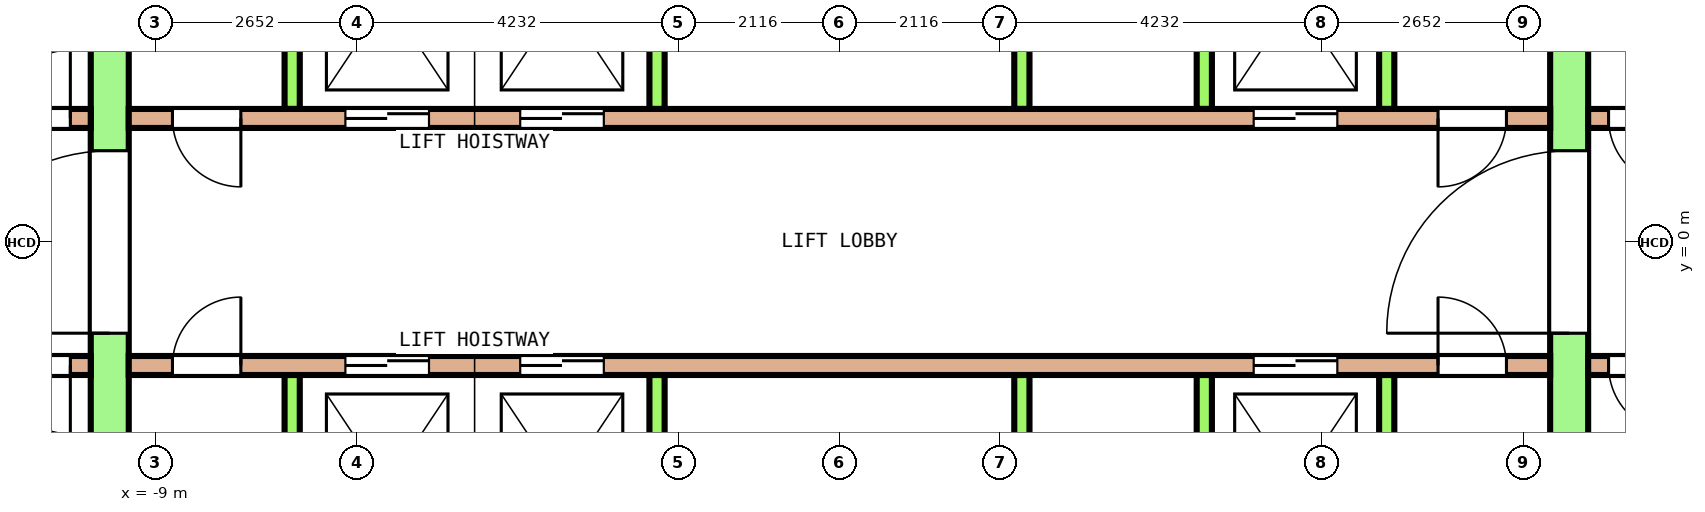
"""IFC4 building model, lengths in metres.
Left out: names, types, materials, properties, quantities, classifications, styles, units other than length and angle.
Written with IfcOpenShell. Run it as: python <this file> out.ifc"""

import sys

from ifc_helpers import new_model, si_unit, direction, frame, frame_2d, origin, place, context, subcontext, project, spatial, rectangle, extrude, element, fill, save


model = new_model("IFC4")
c1 = context("Model", 3, precision=1e-05, world=origin(), true_north=direction((0.0, 1.0)))
c2 = subcontext(c1, "Body", "Model", "MODEL_VIEW")
j1 = project(units=[si_unit("LENGTHUNIT", "METRE"), si_unit("PLANEANGLEUNIT", "RADIAN")], contexts=[c1])
p1 = place(None, origin())
s1 = spatial("IfcSite", under=j1, at=p1, CompositionType="ELEMENT")
p2 = place(p1, origin())
s2 = spatial("IfcBuilding", under=s1, at=p2, CompositionType="ELEMENT")
p3 = place(p2, frame((0.0, 0.0, 162.8)))
s3 = spatial("IfcBuildingStorey", under=s2, at=p3, CompositionType="ELEMENT", Elevation=162.8)
p4 = place(p3, frame((-9.6, -7.75, 0.0), z_axis=(0.0, 0.0, 1.0), x_axis=(0.0, 1.0, 0.0)))
e1 = element("IfcWall", 1, at=p4, inside=s3, PredefinedType="SHEAR", context=c2, shape_type="SweptSolid", body=[
    extrude(rectangle(XDim=15.5, YDim=0.5, at=frame_2d((7.75, 0.0))), origin(), (0.0, 0.0, 1.0), 4.1),
])
p5 = place(p4, frame((6.55, 0.0, 0.0)))
e2 = element("IfcOpeningElement", 2, at=p5, cuts=e1, PredefinedType="OPENING", context=c2, shape_type="SweptSolid", body=[
    extrude(rectangle(XDim=2.4, YDim=2.1, at=frame_2d((1.2, 1.05))), frame((0.0, 0.26, 0.0), z_axis=(0.0, -1.0, 0.0), x_axis=(1.0, 0.0, 0.0)), (0.0, 0.0, 1.0), 0.52),
])
p6 = place(p4, frame((13.45, 0.0, 0.0)))
e3 = element("IfcOpeningElement", 3, at=p6, cuts=e1, PredefinedType="OPENING", context=c2, shape_type="SweptSolid", body=[
    extrude(rectangle(XDim=1.2, YDim=2.1, at=frame_2d((0.6, 1.05))), frame((0.0, 0.26, 0.0), z_axis=(0.0, -1.0, 0.0), x_axis=(1.0, 0.0, 0.0)), (0.0, 0.0, 1.0), 0.52),
])
p7 = place(p4, frame((0.85, 0.0, 0.0)))
e4 = element("IfcOpeningElement", 4, at=p7, cuts=e1, PredefinedType="OPENING", context=c2, shape_type="SweptSolid", body=[
    extrude(rectangle(XDim=1.2, YDim=2.1, at=frame_2d((0.6, 1.05))), frame((0.0, 0.26, 0.0), z_axis=(0.0, -1.0, 0.0), x_axis=(1.0, 0.0, 0.0)), (0.0, 0.0, 1.0), 0.52),
])
p8 = place(p3, frame((9.6, -7.75, 0.0), z_axis=(0.0, 0.0, 1.0), x_axis=(0.0, 1.0, 0.0)))
e5 = element("IfcWall", 5, at=p8, inside=s3, PredefinedType="SHEAR", context=c2, shape_type="SweptSolid", body=[
    extrude(rectangle(XDim=15.5, YDim=0.5, at=frame_2d((7.75, 0.0))), origin(), (0.0, 0.0, 1.0), 4.1),
])
p9 = place(p8, frame((6.55, 0.0, 0.0)))
e6 = element("IfcOpeningElement", 6, at=p9, cuts=e5, PredefinedType="OPENING", context=c2, shape_type="SweptSolid", body=[
    extrude(rectangle(XDim=2.4, YDim=2.1, at=frame_2d((1.2, 1.05))), frame((0.0, 0.26, 0.0), z_axis=(0.0, -1.0, 0.0), x_axis=(1.0, 0.0, 0.0)), (0.0, 0.0, 1.0), 0.52),
])
p10 = place(p8, frame((13.45, 0.0, 0.0)))
e7 = element("IfcOpeningElement", 7, at=p10, cuts=e5, PredefinedType="OPENING", context=c2, shape_type="SweptSolid", body=[
    extrude(rectangle(XDim=1.2, YDim=2.1, at=frame_2d((0.6, 1.05))), frame((0.0, 0.26, 0.0), z_axis=(0.0, -1.0, 0.0), x_axis=(1.0, 0.0, 0.0)), (0.0, 0.0, 1.0), 0.52),
])
p11 = place(p8, frame((0.95, 0.0, 0.0)))
e8 = element("IfcOpeningElement", 8, at=p11, cuts=e5, PredefinedType="OPENING", context=c2, shape_type="SweptSolid", body=[
    extrude(rectangle(XDim=1.0, YDim=2.1, at=frame_2d((0.5, 1.05))), frame((0.0, 0.26, 0.0), z_axis=(0.0, -1.0, 0.0), x_axis=(1.0, 0.0, 0.0)), (0.0, 0.0, 1.0), 0.52),
])
p12 = place(p3, frame((-12.85, 1.625, 0.0), z_axis=(0.0, 0.0, 1.0), x_axis=(1.0, 0.0, 0.0)))
e9 = element("IfcWall", 9, at=p12, inside=s3, PredefinedType="SOLIDWALL", context=c2, shape_type="SweptSolid", body=[
    extrude(rectangle(XDim=3.0, YDim=0.25, at=frame_2d((1.5, 0.0))), origin(), (0.0, 0.0, 1.0), 4.1),
])
p13 = place(p12, frame((0.269, 0.0, 0.0)))
e10 = element("IfcOpeningElement", 10, at=p13, cuts=e9, PredefinedType="OPENING", context=c2, shape_type="SweptSolid", body=[
    extrude(rectangle(XDim=0.9, YDim=2.1, at=frame_2d((0.45, 1.05))), frame((0.0, 0.135, 0.0), z_axis=(0.0, -1.0, 0.0), x_axis=(1.0, 0.0, 0.0)), (0.0, 0.0, 1.0), 0.27),
])
p14 = place(p12, frame((1.831, 0.0, 0.0)))
e11 = element("IfcOpeningElement", 11, at=p14, cuts=e9, PredefinedType="OPENING", context=c2, shape_type="SweptSolid", body=[
    extrude(rectangle(XDim=0.9, YDim=2.1, at=frame_2d((0.45, 1.05))), frame((0.0, 0.135, 0.0), z_axis=(0.0, -1.0, 0.0), x_axis=(1.0, 0.0, 0.0)), (0.0, 0.0, 1.0), 0.27),
])
p15 = place(p3, frame((-9.35, 1.625, 0.0), z_axis=(0.0, 0.0, 1.0), x_axis=(1.0, 0.0, 0.0)))
e12 = element("IfcWall", 12, at=p15, inside=s3, PredefinedType="SOLIDWALL", context=c2, shape_type="SweptSolid", body=[
    extrude(rectangle(XDim=18.7, YDim=0.25, at=frame_2d((9.35, 0.0))), origin(), (0.0, 0.0, 1.0), 4.1),
])
p16 = place(p15, frame((2.85, 0.0, 0.0)))
e13 = element("IfcOpeningElement", 13, at=p16, cuts=e12, PredefinedType="OPENING", context=c2, shape_type="SweptSolid", body=[
    extrude(rectangle(XDim=1.1, YDim=2.1, at=frame_2d((0.55, 1.05))), frame((0.0, 0.135, 0.0), z_axis=(0.0, -1.0, 0.0), x_axis=(1.0, 0.0, 0.0)), (0.0, 0.0, 1.0), 0.27),
])
p17 = place(p15, frame((5.15, 0.0, 0.0)))
e14 = element("IfcOpeningElement", 14, at=p17, cuts=e12, PredefinedType="OPENING", context=c2, shape_type="SweptSolid", body=[
    extrude(rectangle(XDim=1.1, YDim=2.1, at=frame_2d((0.55, 1.05))), frame((0.0, 0.135, 0.0), z_axis=(0.0, -1.0, 0.0), x_axis=(1.0, 0.0, 0.0)), (0.0, 0.0, 1.0), 0.27),
])
p18 = place(p15, frame((14.8, 0.0, 0.0)))
e15 = element("IfcOpeningElement", 15, at=p18, cuts=e12, PredefinedType="OPENING", context=c2, shape_type="SweptSolid", body=[
    extrude(rectangle(XDim=1.1, YDim=2.1, at=frame_2d((0.55, 1.05))), frame((0.0, 0.135, 0.0), z_axis=(0.0, -1.0, 0.0), x_axis=(1.0, 0.0, 0.0)), (0.0, 0.0, 1.0), 0.27),
])
p19 = place(p15, frame((0.575, 0.0, 0.0)))
e16 = element("IfcOpeningElement", 16, at=p19, cuts=e12, PredefinedType="OPENING", context=c2, shape_type="SweptSolid", body=[
    extrude(rectangle(XDim=0.9, YDim=2.1, at=frame_2d((0.45, 1.05))), frame((0.0, 0.135, 0.0), z_axis=(0.0, -1.0, 0.0), x_axis=(1.0, 0.0, 0.0)), (0.0, 0.0, 1.0), 0.27),
])
p20 = place(p15, frame((17.225, 0.0, 0.0)))
e17 = element("IfcOpeningElement", 17, at=p20, cuts=e12, PredefinedType="OPENING", context=c2, shape_type="SweptSolid", body=[
    extrude(rectangle(XDim=0.9, YDim=2.1, at=frame_2d((0.45, 1.05))), frame((0.0, 0.135, 0.0), z_axis=(0.0, -1.0, 0.0), x_axis=(1.0, 0.0, 0.0)), (0.0, 0.0, 1.0), 0.27),
])
p21 = place(p3, frame((9.85, 1.625, 0.0), z_axis=(0.0, 0.0, 1.0), x_axis=(1.0, 0.0, 0.0)))
e18 = element("IfcWall", 18, at=p21, inside=s3, PredefinedType="SOLIDWALL", context=c2, shape_type="SweptSolid", body=[
    extrude(rectangle(XDim=3.0, YDim=0.25, at=frame_2d((1.5, 0.0))), origin(), (0.0, 0.0, 1.0), 4.1),
])
p22 = place(p21, frame((0.269, 0.0, 0.0)))
e19 = element("IfcOpeningElement", 19, at=p22, cuts=e18, PredefinedType="OPENING", context=c2, shape_type="SweptSolid", body=[
    extrude(rectangle(XDim=0.9, YDim=2.1, at=frame_2d((0.45, 1.05))), frame((0.0, 0.135, 0.0), z_axis=(0.0, -1.0, 0.0), x_axis=(1.0, 0.0, 0.0)), (0.0, 0.0, 1.0), 0.27),
])
p23 = place(p21, frame((1.831, 0.0, 0.0)))
e20 = element("IfcOpeningElement", 20, at=p23, cuts=e18, PredefinedType="OPENING", context=c2, shape_type="SweptSolid", body=[
    extrude(rectangle(XDim=0.9, YDim=2.1, at=frame_2d((0.45, 1.05))), frame((0.0, 0.135, 0.0), z_axis=(0.0, -1.0, 0.0), x_axis=(1.0, 0.0, 0.0)), (0.0, 0.0, 1.0), 0.27),
])
for number, where, z_axis, x_axis in (
    (21, (-7.2, 1.75, 0.0), (0.0, 0.0, 1.0), (0.0, 1.0, 0.0)),
    (22, (-2.4, 1.75, 0.0), (0.0, 0.0, 1.0), (0.0, 1.0, 0.0)),
    (23, (2.4, 1.75, 0.0), (0.0, 0.0, 1.0), (0.0, 1.0, 0.0)),
    (24, (4.8, 1.75, 0.0), (0.0, 0.0, 1.0), (0.0, 1.0, 0.0)),
    (25, (7.2, 1.75, 0.0), (0.0, 0.0, 1.0), (0.0, 1.0, 0.0)),
):
    element("IfcWall", number, at=place(p3, frame(where, z_axis=z_axis, x_axis=x_axis)), inside=s3, PredefinedType="SOLIDWALL", context=c2, shape_type="SweptSolid", body=[
        extrude(rectangle(XDim=2.9, YDim=0.2, at=frame_2d((1.45, 0.0))), origin(), (0.0, 0.0, 1.0), 4.1),
    ])
p24 = place(p3, frame((-12.85, -1.625, 0.0), z_axis=(0.0, 0.0, 1.0), x_axis=(1.0, 0.0, 0.0)))
e26 = element("IfcWall", 26, at=p24, inside=s3, PredefinedType="SOLIDWALL", context=c2, shape_type="SweptSolid", body=[
    extrude(rectangle(XDim=3.0, YDim=0.25, at=frame_2d((1.5, 0.0))), origin(), (0.0, 0.0, 1.0), 4.1),
])
p25 = place(p24, frame((0.269, 0.0, 0.0)))
e27 = element("IfcOpeningElement", 27, at=p25, cuts=e26, PredefinedType="OPENING", context=c2, shape_type="SweptSolid", body=[
    extrude(rectangle(XDim=0.9, YDim=2.1, at=frame_2d((0.45, 1.05))), frame((0.0, 0.135, 0.0), z_axis=(0.0, -1.0, 0.0), x_axis=(1.0, 0.0, 0.0)), (0.0, 0.0, 1.0), 0.27),
])
p26 = place(p24, frame((1.831, 0.0, 0.0)))
e28 = element("IfcOpeningElement", 28, at=p26, cuts=e26, PredefinedType="OPENING", context=c2, shape_type="SweptSolid", body=[
    extrude(rectangle(XDim=0.9, YDim=2.1, at=frame_2d((0.45, 1.05))), frame((0.0, 0.135, 0.0), z_axis=(0.0, -1.0, 0.0), x_axis=(1.0, 0.0, 0.0)), (0.0, 0.0, 1.0), 0.27),
])
p27 = place(p3, frame((-9.35, -1.625, 0.0), z_axis=(0.0, 0.0, 1.0), x_axis=(1.0, 0.0, 0.0)))
e29 = element("IfcWall", 29, at=p27, inside=s3, PredefinedType="SOLIDWALL", context=c2, shape_type="SweptSolid", body=[
    extrude(rectangle(XDim=18.7, YDim=0.25, at=frame_2d((9.35, 0.0))), origin(), (0.0, 0.0, 1.0), 4.1),
])
p28 = place(p27, frame((2.85, 0.0, 0.0)))
e30 = element("IfcOpeningElement", 30, at=p28, cuts=e29, PredefinedType="OPENING", context=c2, shape_type="SweptSolid", body=[
    extrude(rectangle(XDim=1.1, YDim=2.1, at=frame_2d((0.55, 1.05))), frame((0.0, 0.135, 0.0), z_axis=(0.0, -1.0, 0.0), x_axis=(1.0, 0.0, 0.0)), (0.0, 0.0, 1.0), 0.27),
])
p29 = place(p27, frame((5.15, 0.0, 0.0)))
e31 = element("IfcOpeningElement", 31, at=p29, cuts=e29, PredefinedType="OPENING", context=c2, shape_type="SweptSolid", body=[
    extrude(rectangle(XDim=1.1, YDim=2.1, at=frame_2d((0.55, 1.05))), frame((0.0, 0.135, 0.0), z_axis=(0.0, -1.0, 0.0), x_axis=(1.0, 0.0, 0.0)), (0.0, 0.0, 1.0), 0.27),
])
p30 = place(p27, frame((14.8, 0.0, 0.0)))
e32 = element("IfcOpeningElement", 32, at=p30, cuts=e29, PredefinedType="OPENING", context=c2, shape_type="SweptSolid", body=[
    extrude(rectangle(XDim=1.1, YDim=2.1, at=frame_2d((0.55, 1.05))), frame((0.0, 0.135, 0.0), z_axis=(0.0, -1.0, 0.0), x_axis=(1.0, 0.0, 0.0)), (0.0, 0.0, 1.0), 0.27),
])
p31 = place(p27, frame((0.575, 0.0, 0.0)))
e33 = element("IfcOpeningElement", 33, at=p31, cuts=e29, PredefinedType="OPENING", context=c2, shape_type="SweptSolid", body=[
    extrude(rectangle(XDim=0.9, YDim=2.1, at=frame_2d((0.45, 1.05))), frame((0.0, 0.135, 0.0), z_axis=(0.0, -1.0, 0.0), x_axis=(1.0, 0.0, 0.0)), (0.0, 0.0, 1.0), 0.27),
])
p32 = place(p27, frame((17.225, 0.0, 0.0)))
e34 = element("IfcOpeningElement", 34, at=p32, cuts=e29, PredefinedType="OPENING", context=c2, shape_type="SweptSolid", body=[
    extrude(rectangle(XDim=0.9, YDim=2.1, at=frame_2d((0.45, 1.05))), frame((0.0, 0.135, 0.0), z_axis=(0.0, -1.0, 0.0), x_axis=(1.0, 0.0, 0.0)), (0.0, 0.0, 1.0), 0.27),
])
p33 = place(p3, frame((9.85, -1.625, 0.0), z_axis=(0.0, 0.0, 1.0), x_axis=(1.0, 0.0, 0.0)))
e35 = element("IfcWall", 35, at=p33, inside=s3, PredefinedType="SOLIDWALL", context=c2, shape_type="SweptSolid", body=[
    extrude(rectangle(XDim=3.0, YDim=0.25, at=frame_2d((1.5, 0.0))), origin(), (0.0, 0.0, 1.0), 4.1),
])
p34 = place(p33, frame((0.269, 0.0, 0.0)))
e36 = element("IfcOpeningElement", 36, at=p34, cuts=e35, PredefinedType="OPENING", context=c2, shape_type="SweptSolid", body=[
    extrude(rectangle(XDim=0.9, YDim=2.1, at=frame_2d((0.45, 1.05))), frame((0.0, 0.135, 0.0), z_axis=(0.0, -1.0, 0.0), x_axis=(1.0, 0.0, 0.0)), (0.0, 0.0, 1.0), 0.27),
])
p35 = place(p33, frame((1.831, 0.0, 0.0)))
e37 = element("IfcOpeningElement", 37, at=p35, cuts=e35, PredefinedType="OPENING", context=c2, shape_type="SweptSolid", body=[
    extrude(rectangle(XDim=0.9, YDim=2.1, at=frame_2d((0.45, 1.05))), frame((0.0, 0.135, 0.0), z_axis=(0.0, -1.0, 0.0), x_axis=(1.0, 0.0, 0.0)), (0.0, 0.0, 1.0), 0.27),
])
for number, where, z_axis, x_axis in (
    (38, (-7.2, -4.65, 0.0), (0.0, 0.0, 1.0), (0.0, 1.0, 0.0)),
    (39, (-2.4, -4.65, 0.0), (0.0, 0.0, 1.0), (0.0, 1.0, 0.0)),
    (40, (2.4, -4.65, 0.0), (0.0, 0.0, 1.0), (0.0, 1.0, 0.0)),
    (41, (4.8, -4.65, 0.0), (0.0, 0.0, 1.0), (0.0, 1.0, 0.0)),
    (42, (7.2, -4.65, 0.0), (0.0, 0.0, 1.0), (0.0, 1.0, 0.0)),
):
    element("IfcWall", number, at=place(p3, frame(where, z_axis=z_axis, x_axis=x_axis)), inside=s3, PredefinedType="SOLIDWALL", context=c2, shape_type="SweptSolid", body=[
        extrude(rectangle(XDim=2.9, YDim=0.2, at=frame_2d((1.45, 0.0))), origin(), (0.0, 0.0, 1.0), 4.1),
    ])
p36 = place(p16, origin())
e43 = element("IfcDoor", 43, at=p36, inside=s3, OperationType="DOUBLE_DOOR_SLIDING", PredefinedType="DOOR", context=c2, shape_type="SweptSolid", body=[
    extrude(rectangle(XDim=1.1, YDim=2.1, at=frame_2d((0.55, 1.05))), frame((0.0, 0.075, 0.0), z_axis=(0.0, -1.0, 0.0), x_axis=(1.0, 0.0, 0.0)), (0.0, 0.0, 1.0), 0.15),
])
fill(e13, e43)
p37 = place(p17, origin())
e44 = element("IfcDoor", 44, at=p37, inside=s3, OperationType="DOUBLE_DOOR_SLIDING", PredefinedType="DOOR", context=c2, shape_type="SweptSolid", body=[
    extrude(rectangle(XDim=1.1, YDim=2.1, at=frame_2d((0.55, 1.05))), frame((0.0, 0.075, 0.0), z_axis=(0.0, -1.0, 0.0), x_axis=(1.0, 0.0, 0.0)), (0.0, 0.0, 1.0), 0.15),
])
fill(e14, e44)
p38 = place(p18, origin())
e45 = element("IfcDoor", 45, at=p38, inside=s3, OperationType="DOUBLE_DOOR_SLIDING", PredefinedType="DOOR", context=c2, shape_type="SweptSolid", body=[
    extrude(rectangle(XDim=1.1, YDim=2.1, at=frame_2d((0.55, 1.05))), frame((0.0, 0.075, 0.0), z_axis=(0.0, -1.0, 0.0), x_axis=(1.0, 0.0, 0.0)), (0.0, 0.0, 1.0), 0.15),
])
fill(e15, e45)
p39 = place(p28, origin())
e46 = element("IfcDoor", 46, at=p39, inside=s3, OperationType="DOUBLE_DOOR_SLIDING", PredefinedType="DOOR", context=c2, shape_type="SweptSolid", body=[
    extrude(rectangle(XDim=1.1, YDim=2.1, at=frame_2d((0.55, 1.05))), frame((0.0, 0.075, 0.0), z_axis=(0.0, -1.0, 0.0), x_axis=(1.0, 0.0, 0.0)), (0.0, 0.0, 1.0), 0.15),
])
fill(e30, e46)
p40 = place(p29, origin())
e47 = element("IfcDoor", 47, at=p40, inside=s3, OperationType="DOUBLE_DOOR_SLIDING", PredefinedType="DOOR", context=c2, shape_type="SweptSolid", body=[
    extrude(rectangle(XDim=1.1, YDim=2.1, at=frame_2d((0.55, 1.05))), frame((0.0, 0.075, 0.0), z_axis=(0.0, -1.0, 0.0), x_axis=(1.0, 0.0, 0.0)), (0.0, 0.0, 1.0), 0.15),
])
fill(e31, e47)
p41 = place(p30, origin())
e48 = element("IfcDoor", 48, at=p41, inside=s3, OperationType="DOUBLE_DOOR_SLIDING", PredefinedType="DOOR", context=c2, shape_type="SweptSolid", body=[
    extrude(rectangle(XDim=1.1, YDim=2.1, at=frame_2d((0.55, 1.05))), frame((0.0, 0.075, 0.0), z_axis=(0.0, -1.0, 0.0), x_axis=(1.0, 0.0, 0.0)), (0.0, 0.0, 1.0), 0.15),
])
fill(e32, e48)
p42 = place(p5, origin())
e49 = element("IfcDoor", 49, at=p42, inside=s3, OperationType="DOUBLE_DOOR_SINGLE_SWING", PredefinedType="DOOR", context=c2, shape_type="SweptSolid", body=[
    extrude(rectangle(XDim=2.4, YDim=2.1, at=frame_2d((1.2, 1.05))), frame((0.0, 0.2, 0.0), z_axis=(0.0, -1.0, 0.0), x_axis=(1.0, 0.0, 0.0)), (0.0, 0.0, 1.0), 0.4),
])
fill(e2, e49)
p43 = place(p9, origin())
e50 = element("IfcDoor", 50, at=p43, inside=s3, OperationType="DOUBLE_DOOR_SINGLE_SWING", PredefinedType="DOOR", context=c2, shape_type="SweptSolid", body=[
    extrude(rectangle(XDim=2.4, YDim=2.1, at=frame_2d((1.2, 1.05))), frame((0.0, 0.2, 0.0), z_axis=(0.0, -1.0, 0.0), x_axis=(1.0, 0.0, 0.0)), (0.0, 0.0, 1.0), 0.4),
])
fill(e6, e50)
p44 = place(p14, origin())
e51 = element("IfcDoor", 51, at=p44, inside=s3, OperationType="SINGLE_SWING_RIGHT", PredefinedType="DOOR", context=c2, shape_type="SweptSolid", body=[
    extrude(rectangle(XDim=0.9, YDim=2.1, at=frame_2d((0.45, 1.05))), frame((0.0, 0.075, 0.0), z_axis=(0.0, -1.0, 0.0), x_axis=(1.0, 0.0, 0.0)), (0.0, 0.0, 1.0), 0.15),
])
fill(e11, e51)
p45 = place(p19, origin())
e52 = element("IfcDoor", 52, at=p45, inside=s3, OperationType="SINGLE_SWING_LEFT", PredefinedType="DOOR", context=c2, shape_type="SweptSolid", body=[
    extrude(rectangle(XDim=0.9, YDim=2.1, at=frame_2d((0.45, 1.05))), frame((0.0, 0.075, 0.0), z_axis=(0.0, -1.0, 0.0), x_axis=(1.0, 0.0, 0.0)), (0.0, 0.0, 1.0), 0.15),
])
fill(e16, e52)
p46 = place(p20, origin())
e53 = element("IfcDoor", 53, at=p46, inside=s3, OperationType="SINGLE_SWING_RIGHT", PredefinedType="DOOR", context=c2, shape_type="SweptSolid", body=[
    extrude(rectangle(XDim=0.9, YDim=2.1, at=frame_2d((0.45, 1.05))), frame((0.0, 0.075, 0.0), z_axis=(0.0, -1.0, 0.0), x_axis=(1.0, 0.0, 0.0)), (0.0, 0.0, 1.0), 0.15),
])
fill(e17, e53)
p47 = place(p22, origin())
e54 = element("IfcDoor", 54, at=p47, inside=s3, OperationType="SINGLE_SWING_LEFT", PredefinedType="DOOR", context=c2, shape_type="SweptSolid", body=[
    extrude(rectangle(XDim=0.9, YDim=2.1, at=frame_2d((0.45, 1.05))), frame((0.0, 0.075, 0.0), z_axis=(0.0, -1.0, 0.0), x_axis=(1.0, 0.0, 0.0)), (0.0, 0.0, 1.0), 0.15),
])
fill(e19, e54)
p48 = place(p26, origin())
e55 = element("IfcDoor", 55, at=p48, inside=s3, OperationType="SINGLE_SWING_RIGHT", PredefinedType="DOOR", context=c2, shape_type="SweptSolid", body=[
    extrude(rectangle(XDim=0.9, YDim=2.1, at=frame_2d((0.45, 1.05))), frame((0.0, 0.075, 0.0), z_axis=(0.0, -1.0, 0.0), x_axis=(1.0, 0.0, 0.0)), (0.0, 0.0, 1.0), 0.15),
])
fill(e28, e55)
p49 = place(p31, origin())
e56 = element("IfcDoor", 56, at=p49, inside=s3, OperationType="SINGLE_SWING_LEFT", PredefinedType="DOOR", context=c2, shape_type="SweptSolid", body=[
    extrude(rectangle(XDim=0.9, YDim=2.1, at=frame_2d((0.45, 1.05))), frame((0.0, 0.075, 0.0), z_axis=(0.0, -1.0, 0.0), x_axis=(1.0, 0.0, 0.0)), (0.0, 0.0, 1.0), 0.15),
])
fill(e33, e56)
p50 = place(p32, origin())
e57 = element("IfcDoor", 57, at=p50, inside=s3, OperationType="SINGLE_SWING_RIGHT", PredefinedType="DOOR", context=c2, shape_type="SweptSolid", body=[
    extrude(rectangle(XDim=0.9, YDim=2.1, at=frame_2d((0.45, 1.05))), frame((0.0, 0.075, 0.0), z_axis=(0.0, -1.0, 0.0), x_axis=(1.0, 0.0, 0.0)), (0.0, 0.0, 1.0), 0.15),
])
fill(e34, e57)
p51 = place(p34, origin())
e58 = element("IfcDoor", 58, at=p51, inside=s3, OperationType="SINGLE_SWING_LEFT", PredefinedType="DOOR", context=c2, shape_type="SweptSolid", body=[
    extrude(rectangle(XDim=0.9, YDim=2.1, at=frame_2d((0.45, 1.05))), frame((0.0, 0.075, 0.0), z_axis=(0.0, -1.0, 0.0), x_axis=(1.0, 0.0, 0.0)), (0.0, 0.0, 1.0), 0.15),
])
fill(e36, e58)
save(model, sys.argv[1])
